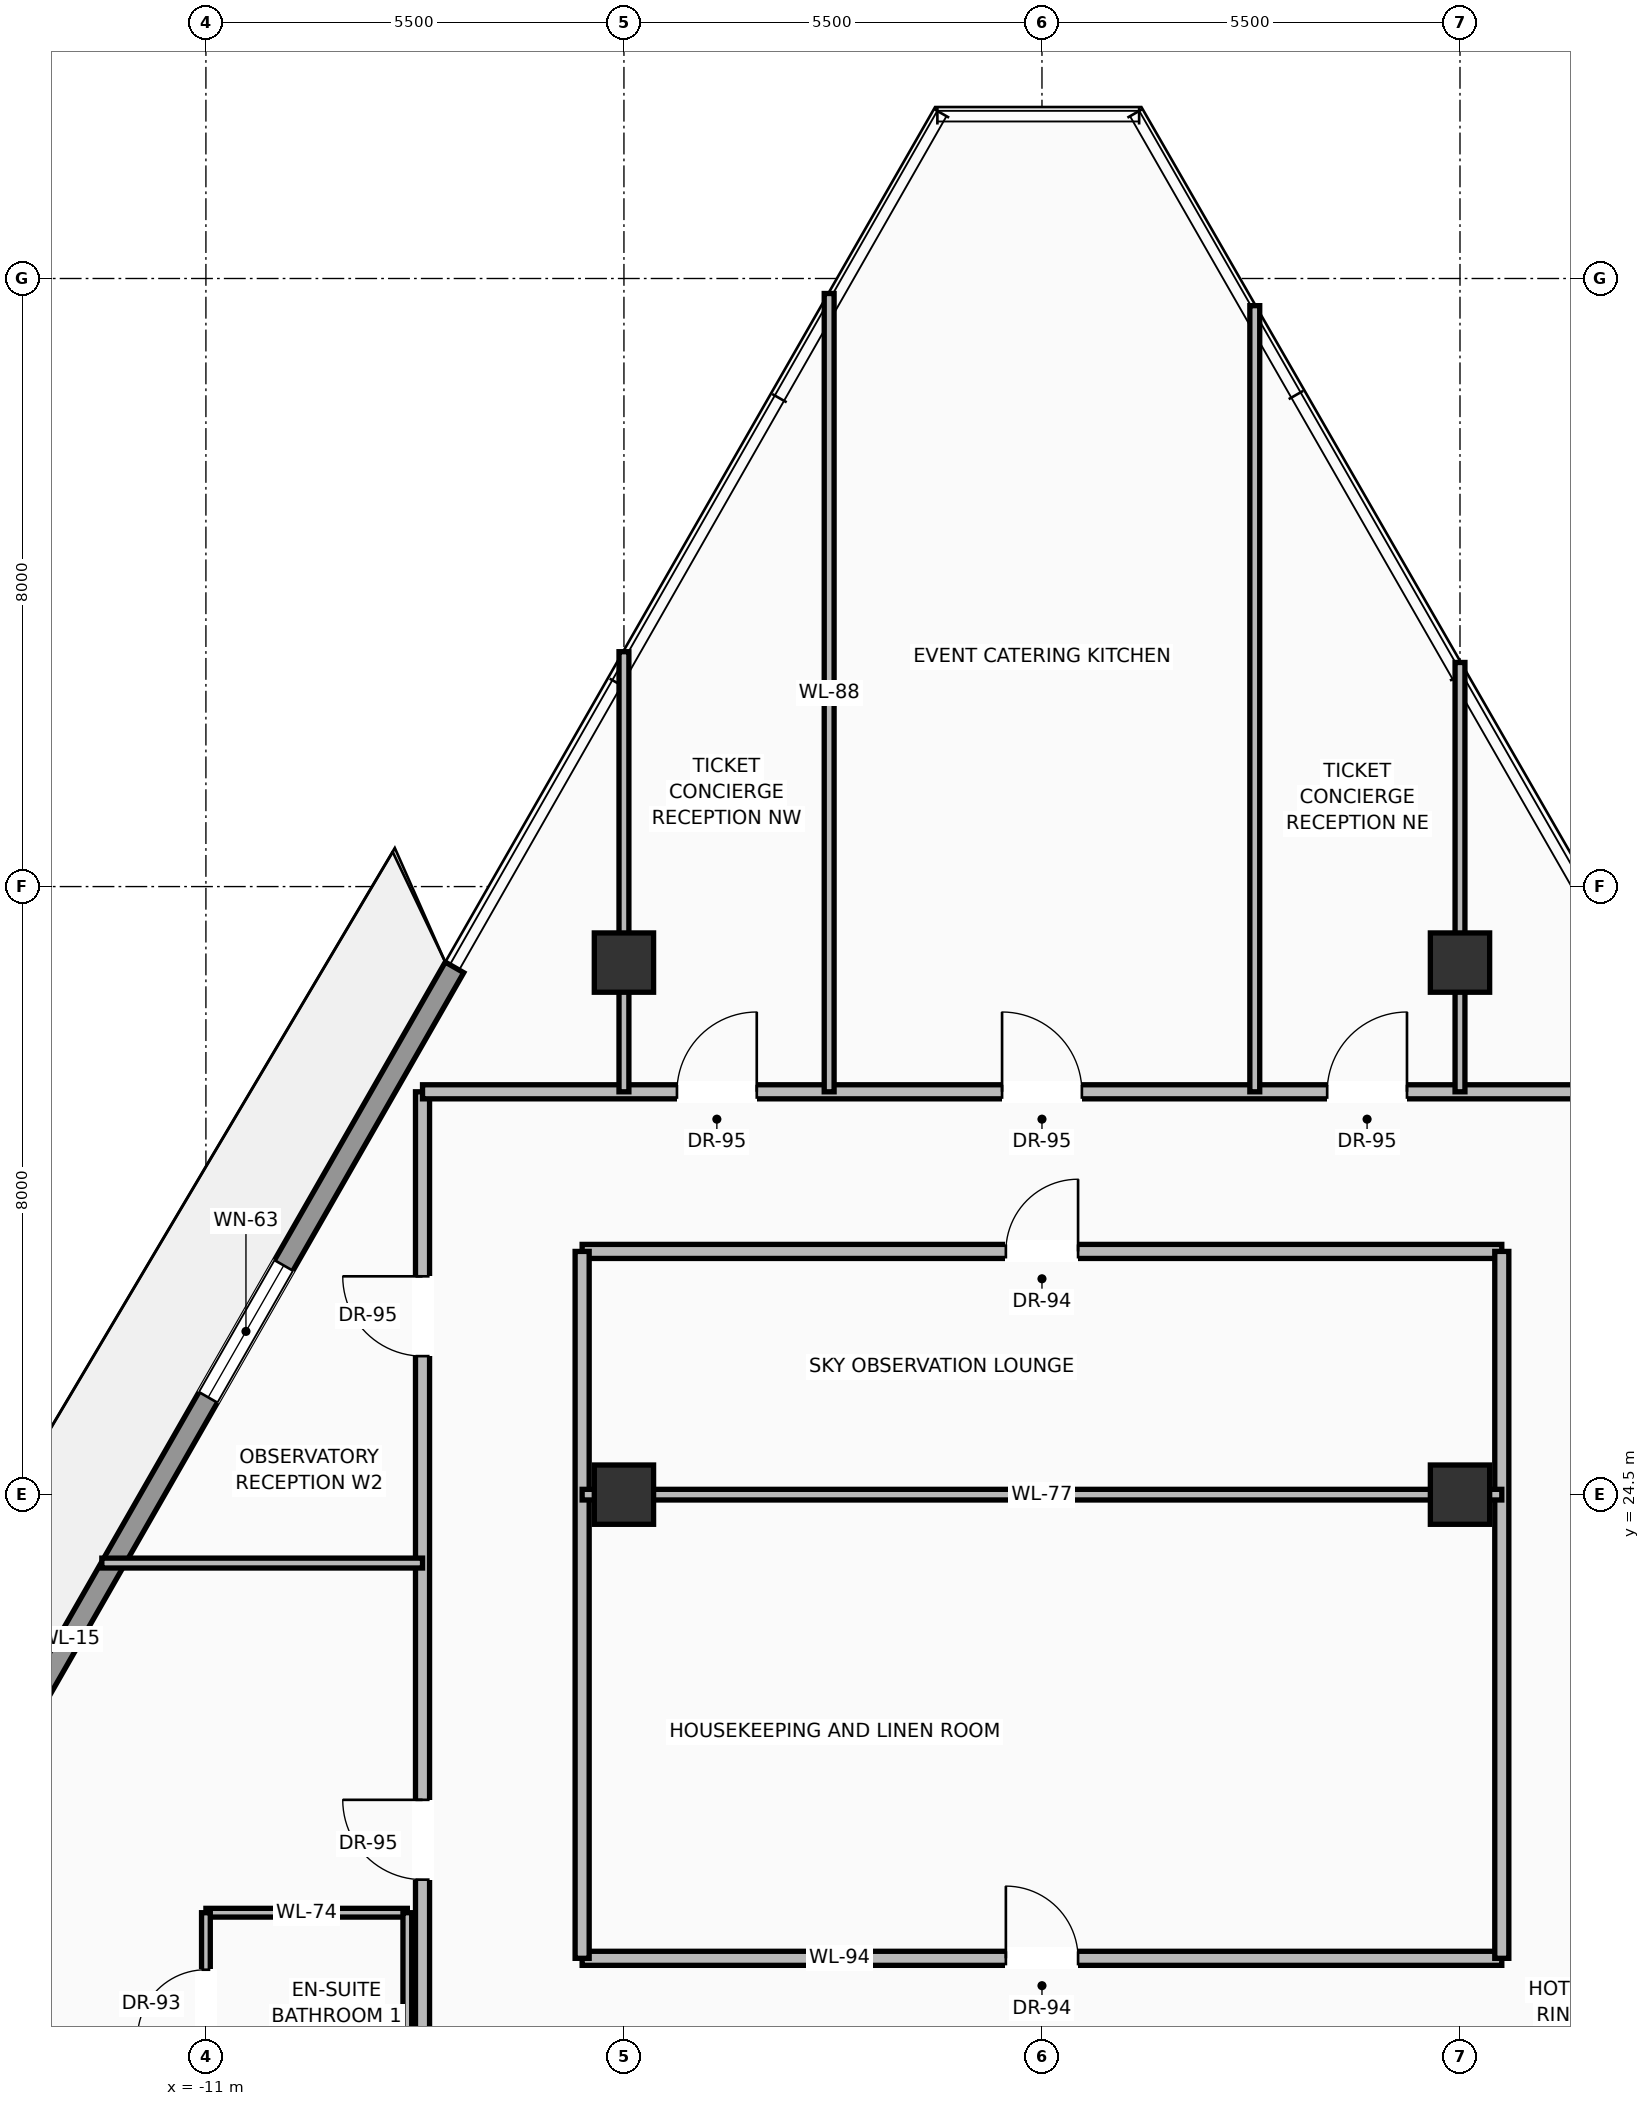
"""IFC4 building model, lengths in metres.
Left out: names, types, materials, properties, quantities, classifications, styles, units other than length and angle.
Written with IfcOpenShell. Run it as: python <this file> out.ifc"""

import sys

from ifc_helpers import new_model, si_unit, direction, frame, frame_2d, origin, origin_2d, place, context, subcontext, project, spatial, rectangle, extrude, source, transform, mapped, element, fill, save


model = new_model("IFC4")
c1 = context("Model", 3, precision=1e-05, world=origin(), true_north=direction((0.0, 1.0)))
c2 = subcontext(c1, "Body", "Model", "MODEL_VIEW")
j1 = project(units=[si_unit("LENGTHUNIT", "METRE"), si_unit("PLANEANGLEUNIT", "RADIAN")], contexts=[c1])
p1 = place(None, origin())
s1 = spatial("IfcSite", under=j1, at=p1, CompositionType="ELEMENT")
p2 = place(p1, origin())
s2 = spatial("IfcBuilding", under=s1, at=p2, CompositionType="ELEMENT")
p3 = place(p2, frame((0.0, 0.0, 297.15)))
s3 = spatial("IfcBuildingStorey", under=s2, at=p3, CompositionType="ELEMENT", Elevation=297.15)
m1 = source(origin(), c2, "Body", "SweptSolid", [
    extrude(rectangle(XDim=0.78, YDim=0.78, at=origin_2d()), origin(), (0.0, 0.0, 1.0), 3.45),
])
for number, where, z_axis, x_axis in (
    (1, (-5.5, 24.5, 0.0), (0.0, 0.0, 1.0), (1.0, 0.0, 0.0)),
    (2, (5.5, 24.5, 0.0), (0.0, 0.0, 1.0), (1.0, 0.0, 0.0)),
    (3, (-5.5, 31.5, 0.0), (0.0, 0.0, 1.0), (1.0, 0.0, 0.0)),
    (4, (5.5, 31.5, 0.0), (0.0, 0.0, 1.0), (1.0, 0.0, 0.0)),
):
    element("IfcColumn", number, at=place(p3, frame(where, z_axis=z_axis, x_axis=x_axis)), inside=s3, PredefinedType="COLUMN", context=c2, shape_type="MappedRepresentation", body=[
        mapped(m1, transform((0.0, 0.0, 0.0), scale=1.0)),
    ])
p4 = place(p3, frame((-17.857, 13.76, 0.0), z_axis=(0.0, 0.0, 1.0), x_axis=(0.497115564006, 0.867684341234, 0.0)))
e5 = element("IfcWall", 5, at=p4, inside=s3, PredefinedType="SOLIDWALL", context=c2, shape_type="SweptSolid", body=[
    extrude(rectangle(XDim=20.373, YDim=0.28, at=frame_2d((10.187, 0.0))), origin(), (0.0, 0.0, 1.0), 2.82),
])
p5 = place(p4, frame((4.889, 0.0, 0.0)))
e6 = element("IfcOpeningElement", 6, at=p5, cuts=e5, PredefinedType="OPENING", context=c2, shape_type="SweptSolid", body=[
    extrude(rectangle(XDim=1.6, YDim=2.35, at=frame_2d((0.8, 1.175))), frame((0.0, 0.15, 0.0), z_axis=(0.0, -1.0, 0.0), x_axis=(1.0, 0.0, 0.0)), (0.0, 0.0, 1.0), 0.3),
])
p6 = place(p4, frame((13.854, 0.0, 0.9)))
e7 = element("IfcOpeningElement", 7, at=p6, cuts=e5, PredefinedType="OPENING", context=c2, shape_type="SweptSolid", body=[
    extrude(rectangle(XDim=2.0, YDim=1.75, at=frame_2d((1.0, 0.875))), frame((0.0, 0.15, 0.0), z_axis=(0.0, -1.0, 0.0), x_axis=(1.0, 0.0, 0.0)), (0.0, 0.0, 1.0), 0.3),
])
p7 = place(p3, frame((-6.05, 18.4, 0.0), z_axis=(0.0, 0.0, 1.0), x_axis=(1.0, 0.0, 0.0)))
e8 = element("IfcWall", 8, at=p7, inside=s3, PredefinedType="PARTITIONING", context=c2, shape_type="SweptSolid", body=[
    extrude(rectangle(XDim=12.1, YDim=0.185, at=frame_2d((6.05, 0.0))), origin(), (0.0, 0.0, 1.0), 3.232),
])
p8 = place(p7, frame((5.575, 0.0, 0.0)))
e9 = element("IfcOpeningElement", 9, at=p8, cuts=e8, PredefinedType="OPENING", context=c2, shape_type="SweptSolid", body=[
    extrude(rectangle(XDim=0.95, YDim=2.2, at=frame_2d((0.475, 1.1))), frame((0.0, 0.103, 0.0), z_axis=(0.0, -1.0, 0.0), x_axis=(1.0, 0.0, 0.0)), (0.0, 0.0, 1.0), 0.205),
])
p9 = place(p3, frame((-6.05, 27.7, 0.0), z_axis=(0.0, 0.0, 1.0), x_axis=(1.0, 0.0, 0.0)))
e10 = element("IfcWall", 10, at=p9, inside=s3, PredefinedType="PARTITIONING", context=c2, shape_type="SweptSolid", body=[
    extrude(rectangle(XDim=12.1, YDim=0.185, at=frame_2d((6.05, 0.0))), origin(), (0.0, 0.0, 1.0), 2.885),
])
p10 = place(p9, frame((5.575, 0.0, 0.0)))
e11 = element("IfcOpeningElement", 11, at=p10, cuts=e10, PredefinedType="OPENING", context=c2, shape_type="SweptSolid", body=[
    extrude(rectangle(XDim=0.95, YDim=2.2, at=frame_2d((0.475, 1.1))), frame((0.0, 0.103, 0.0), z_axis=(0.0, -1.0, 0.0), x_axis=(1.0, 0.0, 0.0)), (0.0, 0.0, 1.0), 0.205),
])
for number, where, z_axis, x_axis in (
    (12, (-6.05, 18.4, 0.0), (0.0, 0.0, 1.0), (0.0, 1.0, 0.0)),
    (13, (6.05, 18.4, 0.0), (0.0, 0.0, 1.0), (0.0, 1.0, 0.0)),
):
    element("IfcWall", number, at=place(p3, frame(where, z_axis=z_axis, x_axis=x_axis)), inside=s3, PredefinedType="PARTITIONING", context=c2, shape_type="SweptSolid", body=[
        extrude(rectangle(XDim=9.3, YDim=0.185, at=frame_2d((4.65, 0.0))), origin(), (0.0, 0.0, 1.0), 3.232),
    ])
p11 = place(p3, frame((-8.15, 16.2, 0.0), z_axis=(0.0, 0.0, 1.0), x_axis=(0.0, 1.0, 0.0)))
e14 = element("IfcWall", 14, at=p11, inside=s3, PredefinedType="PARTITIONING", context=c2, shape_type="SweptSolid", body=[
    extrude(rectangle(XDim=13.6, YDim=0.185, at=frame_2d((6.8, 0.0))), origin(), (0.0, 0.0, 1.0), 3.232),
])
p12 = place(p11, frame((3.235, 0.0, 0.0)))
e15 = element("IfcOpeningElement", 15, at=p12, cuts=e14, PredefinedType="OPENING", context=c2, shape_type="SweptSolid", body=[
    extrude(rectangle(XDim=1.05, YDim=2.25, at=frame_2d((0.525, 1.125))), frame((0.0, 0.103, 0.0), z_axis=(0.0, -1.0, 0.0), x_axis=(1.0, 0.0, 0.0)), (0.0, 0.0, 1.0), 0.205),
])
p13 = place(p11, frame((10.123, 0.0, 0.0)))
e16 = element("IfcOpeningElement", 16, at=p13, cuts=e14, PredefinedType="OPENING", context=c2, shape_type="SweptSolid", body=[
    extrude(rectangle(XDim=1.05, YDim=2.25, at=frame_2d((0.525, 1.125))), frame((0.0, 0.103, 0.0), z_axis=(0.0, -1.0, 0.0), x_axis=(1.0, 0.0, 0.0)), (0.0, 0.0, 1.0), 0.205),
])
p14 = place(p3, frame((-8.15, 29.8, 0.0), z_axis=(0.0, 0.0, 1.0), x_axis=(1.0, 0.0, 0.0)))
e17 = element("IfcWall", 17, at=p14, inside=s3, PredefinedType="PARTITIONING", context=c2, shape_type="SweptSolid", body=[
    extrude(rectangle(XDim=16.3, YDim=0.185, at=frame_2d((8.15, 0.0))), origin(), (0.0, 0.0, 1.0), 3.232),
])
p15 = place(p14, frame((3.347, 0.0, 0.0)))
e18 = element("IfcOpeningElement", 18, at=p15, cuts=e17, PredefinedType="OPENING", context=c2, shape_type="SweptSolid", body=[
    extrude(rectangle(XDim=1.05, YDim=2.25, at=frame_2d((0.525, 1.125))), frame((0.0, 0.103, 0.0), z_axis=(0.0, -1.0, 0.0), x_axis=(1.0, 0.0, 0.0)), (0.0, 0.0, 1.0), 0.205),
])
p16 = place(p14, frame((7.625, 0.0, 0.0)))
e19 = element("IfcOpeningElement", 19, at=p16, cuts=e17, PredefinedType="OPENING", context=c2, shape_type="SweptSolid", body=[
    extrude(rectangle(XDim=1.05, YDim=2.25, at=frame_2d((0.525, 1.125))), frame((0.0, 0.103, 0.0), z_axis=(0.0, -1.0, 0.0), x_axis=(1.0, 0.0, 0.0)), (0.0, 0.0, 1.0), 0.205),
])
p17 = place(p14, frame((11.903, 0.0, 0.0)))
e20 = element("IfcOpeningElement", 20, at=p17, cuts=e17, PredefinedType="OPENING", context=c2, shape_type="SweptSolid", body=[
    extrude(rectangle(XDim=1.05, YDim=2.25, at=frame_2d((0.525, 1.125))), frame((0.0, 0.103, 0.0), z_axis=(0.0, -1.0, 0.0), x_axis=(1.0, 0.0, 0.0)), (0.0, 0.0, 1.0), 0.205),
])
p18 = place(p3, frame((-6.05, 24.5, 0.0), z_axis=(0.0, 0.0, 1.0), x_axis=(1.0, 0.0, 0.0)))
e21 = element("IfcWall", 21, at=p18, inside=s3, PredefinedType="PARTITIONING", context=c2, shape_type="SweptSolid", body=[
    extrude(rectangle(XDim=12.1, YDim=0.14, at=frame_2d((6.05, 0.0))), origin(), (0.0, 0.0, 1.0), 2.683),
])
p19 = place(p3, frame((-5.5, 29.8, 0.0), z_axis=(0.0, 0.0, 1.0), x_axis=(0.0, 1.0, 0.0)))
e22 = element("IfcWall", 22, at=p19, inside=s3, PredefinedType="PARTITIONING", context=c2, shape_type="SweptSolid", body=[
    extrude(rectangle(XDim=5.79, YDim=0.13, at=frame_2d((2.895, 0.0))), origin(), (0.0, 0.0, 1.0), 2.683),
])
p20 = place(p3, frame((5.5, 29.8, 0.0), z_axis=(0.0, 0.0, 1.0), x_axis=(0.0, 1.0, 0.0)))
e23 = element("IfcWall", 23, at=p20, inside=s3, PredefinedType="PARTITIONING", context=c2, shape_type="SweptSolid", body=[
    extrude(rectangle(XDim=5.648, YDim=0.13, at=frame_2d((2.824, 0.0))), origin(), (0.0, 0.0, 1.0), 2.683),
])
p21 = place(p3, frame((-2.8, 29.8, 0.0), z_axis=(0.0, 0.0, 1.0), x_axis=(0.0, 1.0, 0.0)))
e24 = element("IfcWall", 24, at=p21, inside=s3, PredefinedType="PARTITIONING", context=c2, shape_type="SweptSolid", body=[
    extrude(rectangle(XDim=10.502, YDim=0.13, at=frame_2d((5.251, 0.0))), origin(), (0.0, 0.0, 1.0), 3.232),
])
p22 = place(p3, frame((2.8, 29.8, 0.0), z_axis=(0.0, 0.0, 1.0), x_axis=(0.0, 1.0, 0.0)))
e25 = element("IfcWall", 25, at=p22, inside=s3, PredefinedType="PARTITIONING", context=c2, shape_type="SweptSolid", body=[
    extrude(rectangle(XDim=10.343, YDim=0.13, at=frame_2d((5.171, 0.0))), origin(), (0.0, 0.0, 1.0), 3.232),
])
p23 = place(p3, frame((-11.0, 19.0, 0.0), z_axis=(0.0, 0.0, 1.0), x_axis=(1.0, 0.0, 0.0)))
e26 = element("IfcWall", 26, at=p23, inside=s3, PredefinedType="PARTITIONING", context=c2, shape_type="SweptSolid", body=[
    extrude(rectangle(XDim=2.65, YDim=0.115, at=frame_2d((1.325, 0.0))), origin(), (0.0, 0.0, 1.0), 3.232),
])
p24 = place(p3, frame((-11.0, 16.6, 0.0), z_axis=(0.0, 0.0, 1.0), x_axis=(0.0, 1.0, 0.0)))
e27 = element("IfcWall", 27, at=p24, inside=s3, PredefinedType="PARTITIONING", context=c2, shape_type="SweptSolid", body=[
    extrude(rectangle(XDim=2.4, YDim=0.115, at=frame_2d((1.2, 0.0))), origin(), (0.0, 0.0, 1.0), 3.232),
])
p25 = place(p24, frame((0.75, 0.0, 0.0)))
e28 = element("IfcOpeningElement", 28, at=p25, cuts=e27, PredefinedType="OPENING", context=c2, shape_type="SweptSolid", body=[
    extrude(rectangle(XDim=0.9, YDim=2.15, at=frame_2d((0.45, 1.075))), frame((0.0, 0.067, 0.0), z_axis=(0.0, -1.0, 0.0), x_axis=(1.0, 0.0, 0.0)), (0.0, 0.0, 1.0), 0.135),
])
p26 = place(p3, frame((-8.35, 16.6, 0.0), z_axis=(0.0, 0.0, 1.0), x_axis=(0.0, 1.0, 0.0)))
e29 = element("IfcWall", 29, at=p26, inside=s3, PredefinedType="PARTITIONING", context=c2, shape_type="SweptSolid", body=[
    extrude(rectangle(XDim=2.4, YDim=0.115, at=frame_2d((1.2, 0.0))), origin(), (0.0, 0.0, 1.0), 3.232),
])
p27 = place(p3, frame((-12.369, 23.6, 0.0), z_axis=(0.0, 0.0, 1.0), x_axis=(1.0, 0.0, 0.0)))
e30 = element("IfcWall", 30, at=p27, inside=s3, PredefinedType="PARTITIONING", context=c2, shape_type="SweptSolid", body=[
    extrude(rectangle(XDim=4.219, YDim=0.13, at=frame_2d((2.11, 0.0))), origin(), (0.0, 0.0, 1.0), 3.232),
])
m2 = source(origin(), c2, "Body", "SweptSolid", [
    extrude(rectangle(XDim=2.0, YDim=1.75, at=frame_2d((1.0, 0.875))), frame((0.0, 0.03, 0.0), z_axis=(0.0, -1.0, 0.0), x_axis=(1.0, 0.0, 0.0)), (0.0, 0.0, 1.0), 0.06),
])
p28 = place(p6, origin())
e31 = element("IfcWindow", 31, at=p28, inside=s3, PartitioningType="SINGLE_PANEL", PredefinedType="WINDOW", context=c2, shape_type="MappedRepresentation", body=[
    mapped(m2, transform((0.0, 0.0, 0.0), scale=1.0)),
])
fill(e7, e31)
m3 = source(origin(), c2, "Body", "SweptSolid", [
    extrude(rectangle(XDim=0.95, YDim=2.2, at=frame_2d((0.475, 1.1))), frame((0.0, 0.025, 0.0), z_axis=(0.0, -1.0, 0.0), x_axis=(1.0, 0.0, 0.0)), (0.0, 0.0, 1.0), 0.05),
])
p29 = place(p8, origin())
e32 = element("IfcDoor", 32, at=p29, inside=s3, OperationType="SINGLE_SWING_LEFT", PredefinedType="DOOR", context=c2, shape_type="MappedRepresentation", body=[
    mapped(m3, transform((0.0, 0.0, 0.0), scale=1.0)),
])
fill(e9, e32)
p30 = place(p10, origin())
e33 = element("IfcDoor", 33, at=p30, inside=s3, OperationType="SINGLE_SWING_RIGHT", PredefinedType="DOOR", context=c2, shape_type="MappedRepresentation", body=[
    mapped(m3, transform((0.0, 0.0, 0.0), scale=1.0)),
])
fill(e11, e33)
m4 = source(origin(), c2, "Body", "SweptSolid", [
    extrude(rectangle(XDim=1.05, YDim=2.25, at=frame_2d((0.525, 1.125))), frame((0.0, 0.025, 0.0), z_axis=(0.0, -1.0, 0.0), x_axis=(1.0, 0.0, 0.0)), (0.0, 0.0, 1.0), 0.05),
])
p31 = place(p12, origin())
e34 = element("IfcDoor", 34, at=p31, inside=s3, OperationType="SINGLE_SWING_RIGHT", PredefinedType="DOOR", context=c2, shape_type="MappedRepresentation", body=[
    mapped(m4, transform((0.0, 0.0, 0.0), scale=1.0)),
])
fill(e15, e34)
m5 = source(origin(), c2, "Body", "SweptSolid", [
    extrude(rectangle(XDim=0.9, YDim=2.15, at=frame_2d((0.45, 1.075))), frame((0.0, 0.025, 0.0), z_axis=(0.0, -1.0, 0.0), x_axis=(1.0, 0.0, 0.0)), (0.0, 0.0, 1.0), 0.05),
])
p32 = place(p25, origin())
e35 = element("IfcDoor", 35, at=p32, inside=s3, OperationType="SINGLE_SWING_LEFT", PredefinedType="DOOR", context=c2, shape_type="MappedRepresentation", body=[
    mapped(m5, transform((0.0, 0.0, 0.0), scale=1.0)),
])
fill(e28, e35)
p33 = place(p13, origin())
e36 = element("IfcDoor", 36, at=p33, inside=s3, OperationType="SINGLE_SWING_RIGHT", PredefinedType="DOOR", context=c2, shape_type="MappedRepresentation", body=[
    mapped(m4, transform((0.0, 0.0, 0.0), scale=1.0)),
])
fill(e16, e36)
p34 = place(p15, origin())
e37 = element("IfcDoor", 37, at=p34, inside=s3, OperationType="SINGLE_SWING_RIGHT", PredefinedType="DOOR", context=c2, shape_type="MappedRepresentation", body=[
    mapped(m4, transform((0.0, 0.0, 0.0), scale=1.0)),
])
fill(e18, e37)
p35 = place(p16, origin())
e38 = element("IfcDoor", 38, at=p35, inside=s3, OperationType="SINGLE_SWING_LEFT", PredefinedType="DOOR", context=c2, shape_type="MappedRepresentation", body=[
    mapped(m4, transform((0.0, 0.0, 0.0), scale=1.0)),
])
fill(e19, e38)
p36 = place(p17, origin())
e39 = element("IfcDoor", 39, at=p36, inside=s3, OperationType="SINGLE_SWING_RIGHT", PredefinedType="DOOR", context=c2, shape_type="MappedRepresentation", body=[
    mapped(m4, transform((0.0, 0.0, 0.0), scale=1.0)),
])
fill(e20, e39)
save(model, sys.argv[1])
